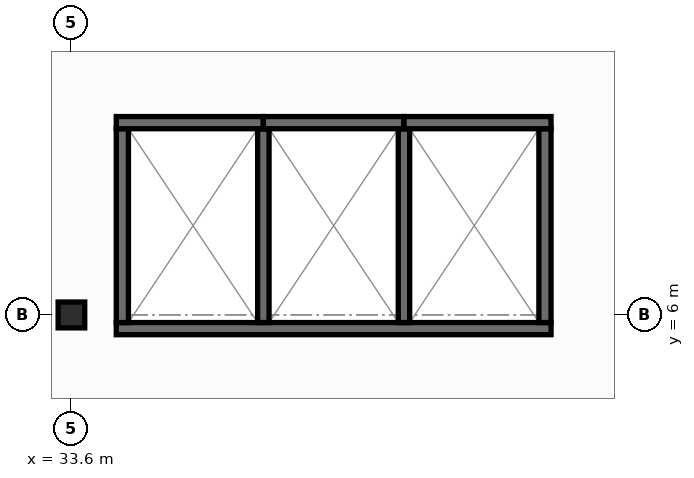
"""IFC4 building model, lengths in metres.
Left out: names, types, materials, properties, quantities, classifications, styles, units other than length and angle.
Written with IfcOpenShell. Run it as: python <this file> out.ifc"""

import sys

from ifc_helpers import new_model, si_unit, direction, frame, frame_2d, origin, origin_2d, place, context, subcontext, project, spatial, rectangle, i_section, extrude, element, save


model = new_model("IFC4")
c1 = context("Model", 3, precision=1e-05, world=origin(), true_north=direction((0.0, 1.0)))
c2 = subcontext(c1, "Body", "Model", "MODEL_VIEW")
j1 = project(units=[si_unit("LENGTHUNIT", "METRE"), si_unit("PLANEANGLEUNIT", "RADIAN")], contexts=[c1])
p1 = place(None, origin())
s1 = spatial("IfcSite", under=j1, at=p1, CompositionType="ELEMENT")
p2 = place(p1, origin())
s2 = spatial("IfcBuilding", under=s1, at=p2, CompositionType="ELEMENT")
p3 = place(p2, frame((0.0, 0.0, 46.2)))
s3 = spatial("IfcBuildingStorey", under=s2, at=p3, CompositionType="ELEMENT", Elevation=46.2)
p4 = place(p3, frame((33.6, 6.0, 0.0), z_axis=(0.0, 0.0, 1.0), x_axis=(1.0, 0.0, 0.0)))
e1 = element("IfcColumn", 1, at=p4, inside=s3, PredefinedType="COLUMN", context=c2, shape_type="SweptSolid", body=[
    extrude(i_section(OverallWidth=0.35, OverallDepth=0.34, WebThickness=0.016, FlangeThickness=0.028, at=origin_2d()), origin(), (0.0, 0.0, 1.0), 3.95),
])
p5 = place(p3, frame((34.19, 5.82, 0.0), z_axis=(0.0, 0.0, 1.0), x_axis=(1.0, 0.0, 0.0)))
e2 = element("IfcWall", 2, at=p5, inside=s3, PredefinedType="SHEAR", context=c2, shape_type="SweptSolid", body=[
    extrude(rectangle(XDim=5.72, YDim=0.16, at=frame_2d((2.86, 0.0))), origin(), (0.0, 0.0, 1.0), 3.71),
])
for number, where, z_axis, x_axis in (
    (3, (34.27, 5.9, 0.0), (0.0, 0.0, 1.0), (0.0, 1.0, 0.0)),
    (4, (39.83, 5.9, 0.0), (0.0, 0.0, 1.0), (0.0, 1.0, 0.0)),
):
    element("IfcWall", number, at=place(p3, frame(where, z_axis=z_axis, x_axis=x_axis)), inside=s3, PredefinedType="SHEAR", context=c2, shape_type="SweptSolid", body=[
        extrude(rectangle(XDim=2.55, YDim=0.16, at=frame_2d((1.275, 0.0))), origin(), (0.0, 0.0, 1.0), 3.71),
    ])
for number, where, z_axis, x_axis in (
    (5, (36.125, 5.9, 0.0), (0.0, 0.0, 1.0), (0.0, 1.0, 0.0)),
    (6, (37.975, 5.9, 0.0), (0.0, 0.0, 1.0), (0.0, 1.0, 0.0)),
):
    element("IfcWall", number, at=place(p3, frame(where, z_axis=z_axis, x_axis=x_axis)), inside=s3, PredefinedType="SHEAR", context=c2, shape_type="SweptSolid", body=[
        extrude(rectangle(XDim=2.55, YDim=0.15, at=frame_2d((1.275, 0.0))), origin(), (0.0, 0.0, 1.0), 3.71),
    ])
p6 = place(p3, frame((34.19, 8.53, 0.0), z_axis=(0.0, 0.0, 1.0), x_axis=(1.0, 0.0, 0.0)))
e7 = element("IfcWall", 7, at=p6, inside=s3, PredefinedType="SHEAR", context=c2, shape_type="SweptSolid", body=[
    extrude(rectangle(XDim=1.935, YDim=0.16, at=frame_2d((0.968, 0.0))), origin(), (0.0, 0.0, 1.0), 3.71),
])
p7 = place(p3, frame((36.125, 8.53, 0.0), z_axis=(0.0, 0.0, 1.0), x_axis=(1.0, 0.0, 0.0)))
e8 = element("IfcWall", 8, at=p7, inside=s3, PredefinedType="SHEAR", context=c2, shape_type="SweptSolid", body=[
    extrude(rectangle(XDim=1.85, YDim=0.16, at=frame_2d((0.925, 0.0))), origin(), (0.0, 0.0, 1.0), 3.71),
])
p8 = place(p3, frame((37.975, 8.53, 0.0), z_axis=(0.0, 0.0, 1.0), x_axis=(1.0, 0.0, 0.0)))
e9 = element("IfcWall", 9, at=p8, inside=s3, PredefinedType="SHEAR", context=c2, shape_type="SweptSolid", body=[
    extrude(rectangle(XDim=1.935, YDim=0.16, at=frame_2d((0.967, 0.0))), origin(), (0.0, 0.0, 1.0), 3.71),
])
save(model, sys.argv[1])
